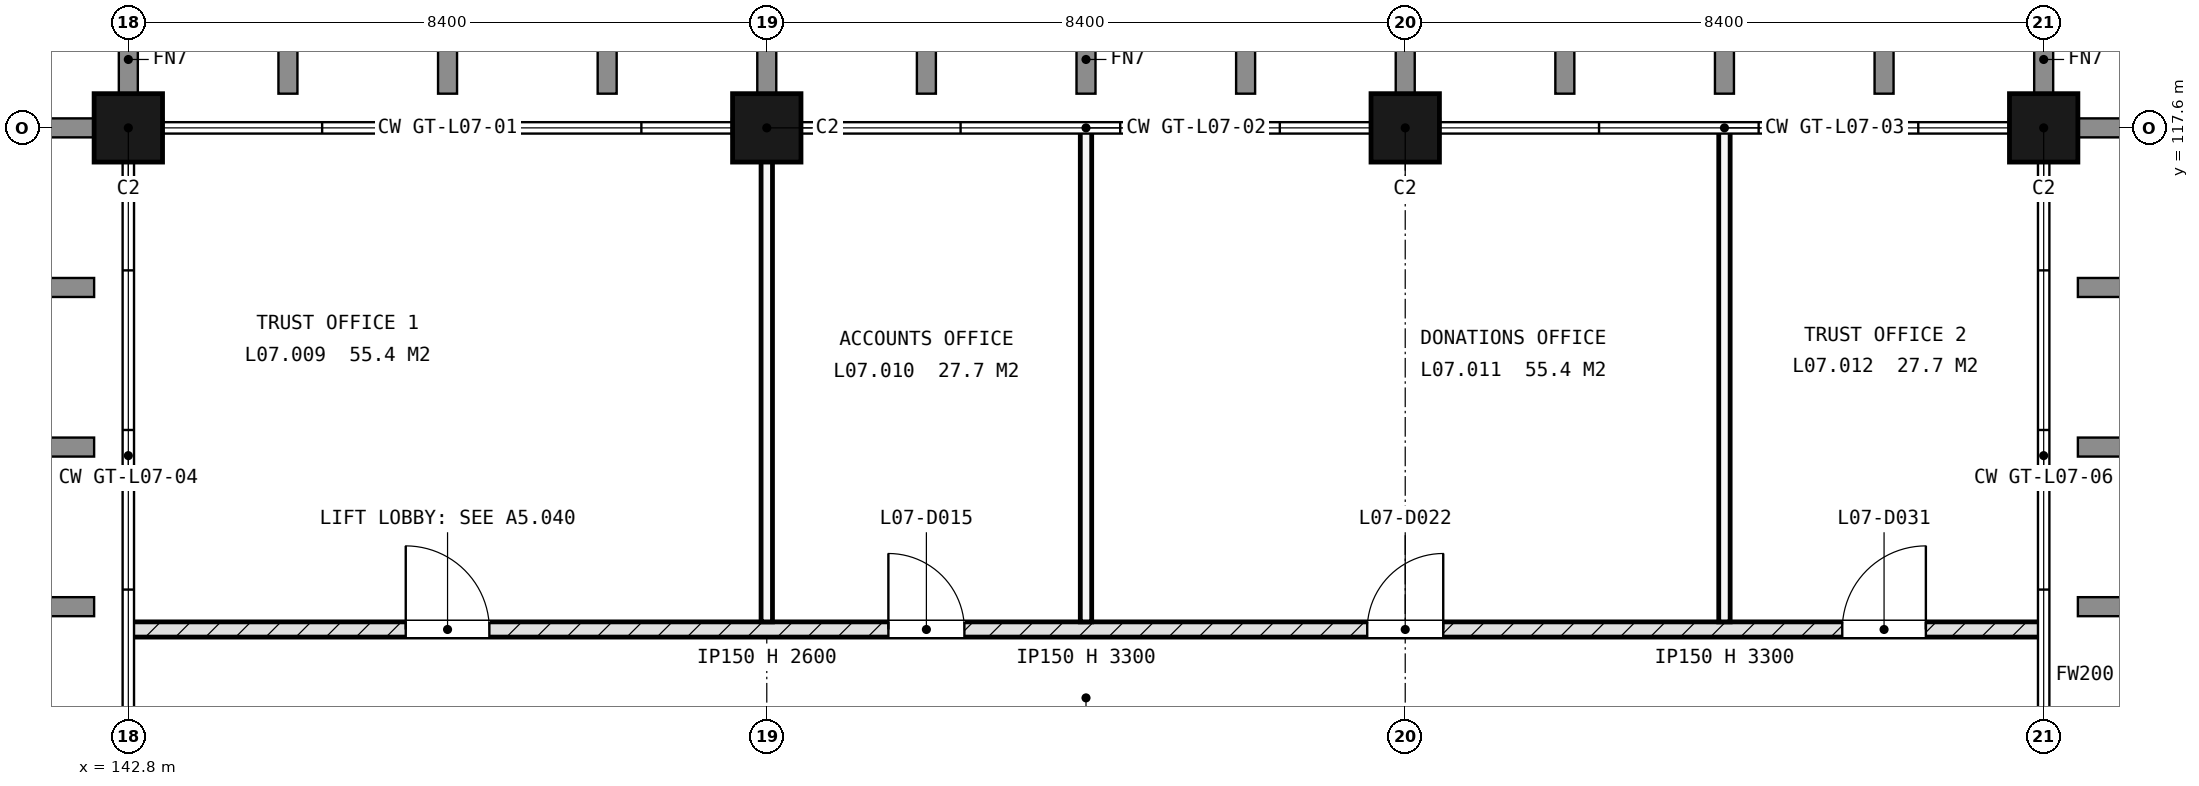
"""IFC4 building model, lengths in metres.
Left out: names, types, materials, properties, quantities, classifications, styles, units other than length and angle.
Written with IfcOpenShell. Run it as: python <this file> out.ifc"""

import sys

from ifc_helpers import new_model, si_unit, direction, frame, frame_2d, origin, origin_2d, place, context, subcontext, project, spatial, rectangle, extrude, element, fill, save


model = new_model("IFC4")
c1 = context("Model", 3, precision=1e-05, world=origin(), true_north=direction((0.0, 1.0)))
c2 = subcontext(c1, "Body", "Model", "MODEL_VIEW")
j1 = project(units=[si_unit("LENGTHUNIT", "METRE"), si_unit("PLANEANGLEUNIT", "RADIAN")], contexts=[c1])
p1 = place(None, origin())
s1 = spatial("IfcSite", under=j1, at=p1, CompositionType="ELEMENT")
p2 = place(p1, origin())
s2 = spatial("IfcBuilding", under=s1, at=p2, CompositionType="ELEMENT")
p3 = place(p2, frame((0.0, 0.0, 28.8)))
s3 = spatial("IfcBuildingStorey", under=s2, at=p3, CompositionType="ELEMENT", Elevation=28.8)
for number, where, z_axis, x_axis in (
    (1, (142.8, 117.6, -0.25), (0.0, 0.0, 1.0), (1.0, 0.0, 0.0)),
    (2, (151.2, 117.6, -0.25), (0.0, 0.0, 1.0), (1.0, 0.0, 0.0)),
    (3, (159.6, 117.6, -0.25), (0.0, 0.0, 1.0), (1.0, 0.0, 0.0)),
    (4, (168.0, 117.6, -0.25), (0.0, 0.0, 1.0), (1.0, 0.0, 0.0)),
):
    element("IfcColumn", number, at=place(p3, frame(where, z_axis=z_axis, x_axis=x_axis)), inside=s3, PredefinedType="COLUMN", context=c2, shape_type="SweptSolid", body=[
        extrude(rectangle(XDim=0.9, YDim=0.9, at=origin_2d()), origin(), (0.0, 0.0, 1.0), 3.6),
    ])
p4 = place(p3, frame((142.8, 111.0, 0.0), z_axis=(0.0, 0.0, 1.0), x_axis=(1.0, 0.0, 0.0)))
e5 = element("IfcWall", 5, at=p4, inside=s3, PredefinedType="SOLIDWALL", context=c2, shape_type="SweptSolid", body=[
    extrude(rectangle(XDim=25.2, YDim=0.2, at=frame_2d((12.6, 0.0))), origin(), (0.0, 0.0, 1.0), 3.3),
])
p5 = place(p4, frame((3.65, 0.0, 0.0)))
e6 = element("IfcOpeningElement", 6, at=p5, cuts=e5, PredefinedType="OPENING", context=c2, shape_type="SweptSolid", body=[
    extrude(rectangle(XDim=1.1, YDim=2.25, at=frame_2d((0.55, 1.125))), frame((0.0, 0.11, 0.0), z_axis=(0.0, -1.0, 0.0), x_axis=(1.0, 0.0, 0.0)), (0.0, 0.0, 1.0), 0.22),
])
p6 = place(p4, frame((10.0, 0.0, 0.0)))
e7 = element("IfcOpeningElement", 7, at=p6, cuts=e5, PredefinedType="OPENING", context=c2, shape_type="SweptSolid", body=[
    extrude(rectangle(XDim=1.0, YDim=2.1, at=frame_2d((0.5, 1.05))), frame((0.0, 0.11, 0.0), z_axis=(0.0, -1.0, 0.0), x_axis=(1.0, 0.0, 0.0)), (0.0, 0.0, 1.0), 0.22),
])
p7 = place(p4, frame((16.3, 0.0, 0.0)))
e8 = element("IfcOpeningElement", 8, at=p7, cuts=e5, PredefinedType="OPENING", context=c2, shape_type="SweptSolid", body=[
    extrude(rectangle(XDim=1.0, YDim=2.1, at=frame_2d((0.5, 1.05))), frame((0.0, 0.11, 0.0), z_axis=(0.0, -1.0, 0.0), x_axis=(1.0, 0.0, 0.0)), (0.0, 0.0, 1.0), 0.22),
])
p8 = place(p4, frame((22.55, 0.0, 0.0)))
e9 = element("IfcOpeningElement", 9, at=p8, cuts=e5, PredefinedType="OPENING", context=c2, shape_type="SweptSolid", body=[
    extrude(rectangle(XDim=1.1, YDim=2.25, at=frame_2d((0.55, 1.125))), frame((0.0, 0.11, 0.0), z_axis=(0.0, -1.0, 0.0), x_axis=(1.0, 0.0, 0.0)), (0.0, 0.0, 1.0), 0.22),
])
p9 = place(p3, frame((151.2, 111.1, 0.0), z_axis=(0.0, 0.0, 1.0), x_axis=(0.0, 1.0, 0.0)))
e10 = element("IfcWall", 10, at=p9, inside=s3, PredefinedType="PARTITIONING", context=c2, shape_type="SweptSolid", body=[
    extrude(rectangle(XDim=6.5, YDim=0.15, at=frame_2d((3.25, 0.0))), origin(), (0.0, 0.0, 1.0), 2.6),
])
for number, where, z_axis, x_axis in (
    (11, (155.4, 111.1, 0.0), (0.0, 0.0, 1.0), (0.0, 1.0, 0.0)),
    (12, (163.8, 111.1, 0.0), (0.0, 0.0, 1.0), (0.0, 1.0, 0.0)),
):
    element("IfcWall", number, at=place(p3, frame(where, z_axis=z_axis, x_axis=x_axis)), inside=s3, PredefinedType="PARTITIONING", context=c2, shape_type="SweptSolid", body=[
        extrude(rectangle(XDim=6.5, YDim=0.15, at=frame_2d((3.25, 0.0))), origin(), (0.0, 0.0, 1.0), 3.3),
    ])
p10 = place(p5, origin())
e13 = element("IfcDoor", 13, at=p10, inside=s3, OperationType="SINGLE_SWING_RIGHT", PredefinedType="DOOR", context=c2, shape_type="SweptSolid", body=[
    extrude(rectangle(XDim=1.1, YDim=2.25, at=frame_2d((0.55, 1.125))), frame((0.0, 0.025, 0.0), z_axis=(0.0, -1.0, 0.0), x_axis=(1.0, 0.0, 0.0)), (0.0, 0.0, 1.0), 0.05),
])
fill(e6, e13)
p11 = place(p6, origin())
e14 = element("IfcDoor", 14, at=p11, inside=s3, OperationType="SINGLE_SWING_RIGHT", PredefinedType="DOOR", context=c2, shape_type="SweptSolid", body=[
    extrude(rectangle(XDim=1.0, YDim=2.1, at=frame_2d((0.5, 1.05))), frame((0.0, 0.025, 0.0), z_axis=(0.0, -1.0, 0.0), x_axis=(1.0, 0.0, 0.0)), (0.0, 0.0, 1.0), 0.05),
])
fill(e7, e14)
p12 = place(p7, origin())
e15 = element("IfcDoor", 15, at=p12, inside=s3, OperationType="SINGLE_SWING_LEFT", PredefinedType="DOOR", context=c2, shape_type="SweptSolid", body=[
    extrude(rectangle(XDim=1.0, YDim=2.1, at=frame_2d((0.5, 1.05))), frame((0.0, 0.025, 0.0), z_axis=(0.0, -1.0, 0.0), x_axis=(1.0, 0.0, 0.0)), (0.0, 0.0, 1.0), 0.05),
])
fill(e8, e15)
p13 = place(p8, origin())
e16 = element("IfcDoor", 16, at=p13, inside=s3, OperationType="SINGLE_SWING_LEFT", PredefinedType="DOOR", context=c2, shape_type="SweptSolid", body=[
    extrude(rectangle(XDim=1.1, YDim=2.25, at=frame_2d((0.55, 1.125))), frame((0.0, 0.025, 0.0), z_axis=(0.0, -1.0, 0.0), x_axis=(1.0, 0.0, 0.0)), (0.0, 0.0, 1.0), 0.05),
])
fill(e9, e16)
save(model, sys.argv[1])
